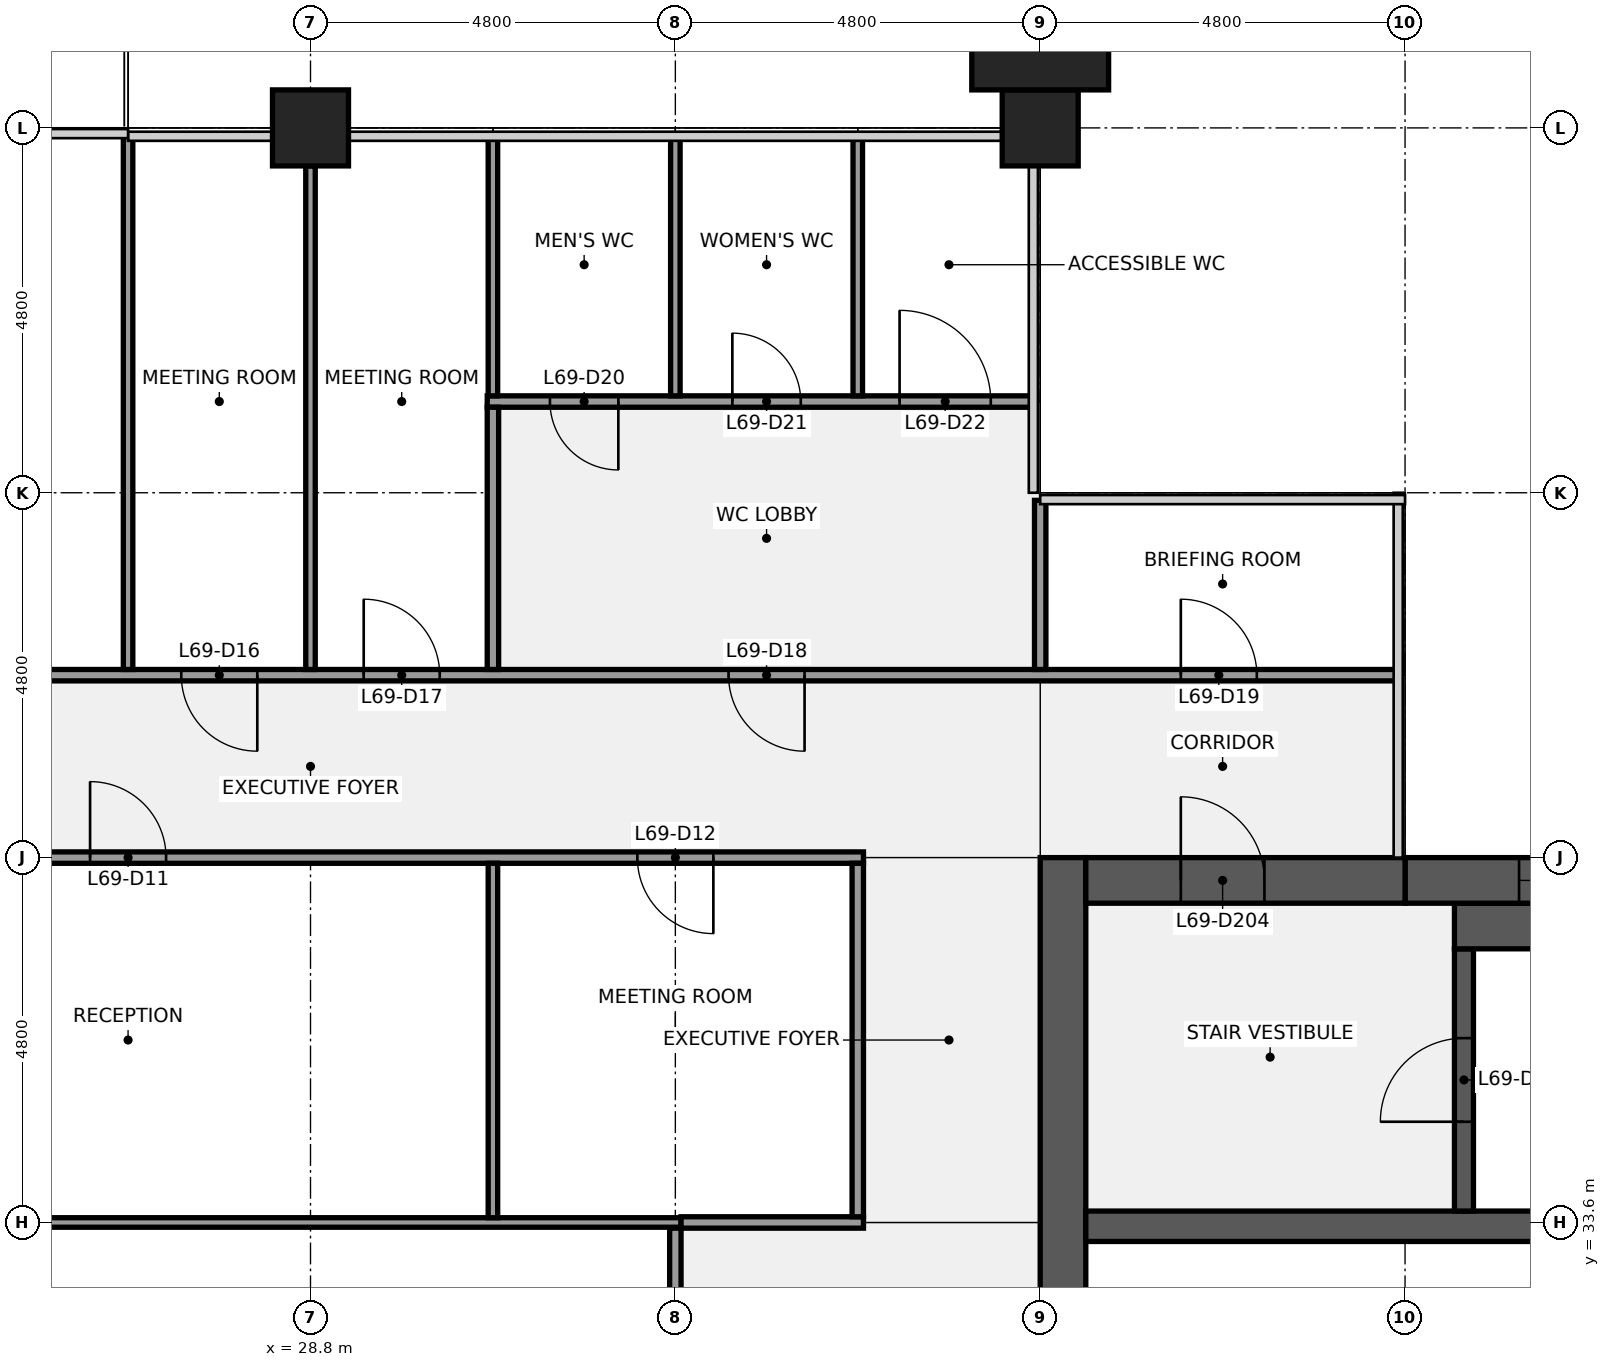
"""IFC4 building model, lengths in metres.
Left out: names, types, materials, properties, quantities, classifications, styles, units other than length and angle.
Written with IfcOpenShell. Run it as: python <this file> out.ifc"""

import sys

from ifc_helpers import new_model, si_unit, direction, frame, frame_2d, origin, origin_2d, place, context, subcontext, project, spatial, rectangle, extrude, element, fill, save


model = new_model("IFC4")
c1 = context("Model", 3, precision=1e-05, world=origin(), true_north=direction((0.0, 1.0)))
c2 = subcontext(c1, "Body", "Model", "MODEL_VIEW")
j1 = project(units=[si_unit("LENGTHUNIT", "METRE"), si_unit("PLANEANGLEUNIT", "RADIAN")], contexts=[c1])
p1 = place(None, origin())
s1 = spatial("IfcSite", under=j1, at=p1, CompositionType="ELEMENT")
p2 = place(p1, origin())
s2 = spatial("IfcBuilding", under=s1, at=p2, CompositionType="ELEMENT")
p3 = place(p2, frame((0.0, 0.0, 314.3)))
s3 = spatial("IfcBuildingStorey", under=s2, at=p3, CompositionType="ELEMENT", Elevation=314.3)
for number, where, z_axis, x_axis in (
    (1, (28.8, 48.0, 0.0), (0.0, 0.0, 1.0), (1.0, 0.0, 0.0)),
    (2, (38.4, 48.0, 0.0), (0.0, 0.0, 1.0), (1.0, 0.0, 0.0)),
):
    element("IfcColumn", number, at=place(p3, frame(where, z_axis=z_axis, x_axis=x_axis)), inside=s3, PredefinedType="COLUMN", context=c2, shape_type="SweptSolid", body=[
        extrude(rectangle(XDim=1.0, YDim=1.0, at=origin_2d()), origin(), (0.0, 0.0, 1.0), 4.0),
    ])
p4 = place(p3, frame((38.7, 9.6, 0.0), z_axis=(0.0, 0.0, 1.0), x_axis=(0.0, 1.0, 0.0)))
e3 = element("IfcWall", 3, at=p4, inside=s3, PredefinedType="SHEAR", context=c2, shape_type="SweptSolid", body=[
    extrude(rectangle(XDim=28.8, YDim=0.6, at=frame_2d((14.4, 0.0))), origin(), (0.0, 0.0, 1.0), 3.84),
])
p5 = place(p4, frame((8.7, 0.0, 0.0)))
e4 = element("IfcOpeningElement", 4, at=p5, cuts=e3, PredefinedType="OPENING", context=c2, shape_type="SweptSolid", body=[
    extrude(rectangle(XDim=1.8, YDim=2.1, at=frame_2d((0.9, 1.05))), frame((0.0, 0.31, 0.0), z_axis=(0.0, -1.0, 0.0), x_axis=(1.0, 0.0, 0.0)), (0.0, 0.0, 1.0), 0.62),
])
p6 = place(p4, frame((18.3, 0.0, 0.0)))
e5 = element("IfcOpeningElement", 5, at=p6, cuts=e3, PredefinedType="OPENING", context=c2, shape_type="SweptSolid", body=[
    extrude(rectangle(XDim=1.8, YDim=2.1, at=frame_2d((0.9, 1.05))), frame((0.0, 0.31, 0.0), z_axis=(0.0, -1.0, 0.0), x_axis=(1.0, 0.0, 0.0)), (0.0, 0.0, 1.0), 0.62),
])
p7 = place(p3, frame((39.0, 33.55, 0.0), z_axis=(0.0, 0.0, 1.0), x_axis=(1.0, 0.0, 0.0)))
e6 = element("IfcWall", 6, at=p7, inside=s3, PredefinedType="SHEAR", context=c2, shape_type="SweptSolid", body=[
    extrude(rectangle(XDim=18.0, YDim=0.4, at=frame_2d((9.0, 0.0))), origin(), (0.0, 0.0, 1.0), 3.84),
])
p8 = place(p3, frame((43.975, 33.75, 0.0), z_axis=(0.0, 0.0, 1.0), x_axis=(0.0, 1.0, 0.0)))
e7 = element("IfcWall", 7, at=p8, inside=s3, PredefinedType="SHEAR", context=c2, shape_type="SweptSolid", body=[
    extrude(rectangle(XDim=3.45, YDim=0.25, at=frame_2d((1.725, 0.0))), origin(), (0.0, 0.0, 1.0), 3.84),
])
p9 = place(p8, frame((1.175, 0.0, 0.0)))
e8 = element("IfcOpeningElement", 8, at=p9, cuts=e7, PredefinedType="OPENING", context=c2, shape_type="SweptSolid", body=[
    extrude(rectangle(XDim=1.1, YDim=2.1, at=frame_2d((0.55, 1.05))), frame((0.0, 0.135, 0.0), z_axis=(0.0, -1.0, 0.0), x_axis=(1.0, 0.0, 0.0)), (0.0, 0.0, 1.0), 0.27),
])
p10 = place(p3, frame((43.85, 37.5, 0.0), z_axis=(0.0, 0.0, 1.0), x_axis=(1.0, 0.0, 0.0)))
e9 = element("IfcWall", 9, at=p10, inside=s3, PredefinedType="SHEAR", context=c2, shape_type="SweptSolid", body=[
    extrude(rectangle(XDim=7.5, YDim=0.6, at=frame_2d((3.75, 0.0))), origin(), (0.0, 0.0, 1.0), 3.84),
])
p11 = place(p3, frame((43.2, 38.1, 0.0), z_axis=(0.0, 0.0, 1.0), x_axis=(1.0, 0.0, 0.0)))
e10 = element("IfcWall", 10, at=p11, inside=s3, PredefinedType="SHEAR", context=c2, shape_type="SweptSolid", body=[
    extrude(rectangle(XDim=13.8, YDim=0.6, at=frame_2d((6.9, 0.0))), origin(), (0.0, 0.0, 1.0), 3.84),
])
p12 = place(p11, frame((6.3, 0.0, 0.9)))
e11 = element("IfcOpeningElement", 11, at=p12, cuts=e10, PredefinedType="OPENING", context=c2, shape_type="SweptSolid", body=[
    extrude(rectangle(XDim=1.8, YDim=1.5, at=frame_2d((0.9, 0.75))), frame((0.0, 0.31, 0.0), z_axis=(0.0, -1.0, 0.0), x_axis=(1.0, 0.0, 0.0)), (0.0, 0.0, 1.0), 0.62),
])
p13 = place(p11, frame((1.5, 0.0, 0.9)))
e12 = element("IfcOpeningElement", 12, at=p13, cuts=e10, PredefinedType="OPENING", context=c2, shape_type="SweptSolid", body=[
    extrude(rectangle(XDim=1.8, YDim=1.5, at=frame_2d((0.9, 0.75))), frame((0.0, 0.31, 0.0), z_axis=(0.0, -1.0, 0.0), x_axis=(1.0, 0.0, 0.0)), (0.0, 0.0, 1.0), 0.62),
])
p14 = place(p3, frame((39.0, 38.1, 0.0), z_axis=(0.0, 0.0, 1.0), x_axis=(1.0, 0.0, 0.0)))
e13 = element("IfcWall", 13, at=p14, inside=s3, PredefinedType="SHEAR", context=c2, shape_type="SweptSolid", body=[
    extrude(rectangle(XDim=4.2, YDim=0.6, at=frame_2d((2.1, 0.0))), origin(), (0.0, 0.0, 1.0), 3.84),
])
p15 = place(p14, frame((1.25, 0.0, 0.0)))
e14 = element("IfcOpeningElement", 14, at=p15, cuts=e13, PredefinedType="OPENING", context=c2, shape_type="SweptSolid", body=[
    extrude(rectangle(XDim=1.1, YDim=2.1, at=frame_2d((0.55, 1.05))), frame((0.0, 0.31, 0.0), z_axis=(0.0, -1.0, 0.0), x_axis=(1.0, 0.0, 0.0)), (0.0, 0.0, 1.0), 0.62),
])
p16 = place(p3, frame((24.075, 33.6, 0.0), z_axis=(0.0, 0.0, 1.0), x_axis=(1.0, 0.0, 0.0)))
e15 = element("IfcWall", 15, at=p16, inside=s3, PredefinedType="PARTITIONING", context=c2, shape_type="SweptSolid", body=[
    extrude(rectangle(XDim=9.6, YDim=0.125, at=frame_2d((4.8, 0.0))), origin(), (0.0, 0.0, 1.0), 2.87),
])
p17 = place(p3, frame((33.675, 33.6, 0.0), z_axis=(0.0, 0.0, 1.0), x_axis=(1.0, 0.0, 0.0)))
e16 = element("IfcWall", 16, at=p17, inside=s3, PredefinedType="PARTITIONING", context=c2, shape_type="SweptSolid", body=[
    extrude(rectangle(XDim=2.4, YDim=0.15, at=frame_2d((1.2, 0.0))), origin(), (0.0, 0.0, 1.0), 2.87),
])
p18 = place(p3, frame((21.525, 38.4, 0.0), z_axis=(0.0, 0.0, 1.0), x_axis=(1.0, 0.0, 0.0)))
e17 = element("IfcWall", 17, at=p18, inside=s3, PredefinedType="PARTITIONING", context=c2, shape_type="SweptSolid", body=[
    extrude(rectangle(XDim=14.55, YDim=0.15, at=frame_2d((7.275, 0.0))), origin(), (0.0, 0.0, 1.0), 2.87),
])
p19 = place(p18, frame((4.375, 0.0, 0.0)))
e18 = element("IfcOpeningElement", 18, at=p19, cuts=e17, PredefinedType="OPENING", context=c2, shape_type="SweptSolid", body=[
    extrude(rectangle(XDim=1.0, YDim=2.1, at=frame_2d((0.5, 1.05))), frame((0.0, 0.085, 0.0), z_axis=(0.0, -1.0, 0.0), x_axis=(1.0, 0.0, 0.0)), (0.0, 0.0, 1.0), 0.17),
])
p20 = place(p18, frame((11.575, 0.0, 0.0)))
e19 = element("IfcOpeningElement", 19, at=p20, cuts=e17, PredefinedType="OPENING", context=c2, shape_type="SweptSolid", body=[
    extrude(rectangle(XDim=1.0, YDim=2.1, at=frame_2d((0.5, 1.05))), frame((0.0, 0.085, 0.0), z_axis=(0.0, -1.0, 0.0), x_axis=(1.0, 0.0, 0.0)), (0.0, 0.0, 1.0), 0.17),
])
p21 = place(p3, frame((14.5, 40.8, 0.0), z_axis=(0.0, 0.0, 1.0), x_axis=(1.0, 0.0, 0.0)))
e20 = element("IfcWall", 20, at=p21, inside=s3, PredefinedType="PARTITIONING", context=c2, shape_type="SweptSolid", body=[
    extrude(rectangle(XDim=28.6, YDim=0.15, at=frame_2d((14.3, 0.0))), origin(), (0.0, 0.0, 1.0), 2.87),
])
p22 = place(p21, frame((1.85, 0.0, 0.0)))
e21 = element("IfcOpeningElement", 21, at=p22, cuts=e20, PredefinedType="OPENING", context=c2, shape_type="SweptSolid", body=[
    extrude(rectangle(XDim=1.0, YDim=2.1, at=frame_2d((0.5, 1.05))), frame((0.0, 0.085, 0.0), z_axis=(0.0, -1.0, 0.0), x_axis=(1.0, 0.0, 0.0)), (0.0, 0.0, 1.0), 0.17),
])
p23 = place(p21, frame((5.4, 0.0, 0.0)))
e22 = element("IfcOpeningElement", 22, at=p23, cuts=e20, PredefinedType="OPENING", context=c2, shape_type="SweptSolid", body=[
    extrude(rectangle(XDim=1.0, YDim=2.1, at=frame_2d((0.5, 1.05))), frame((0.0, 0.085, 0.0), z_axis=(0.0, -1.0, 0.0), x_axis=(1.0, 0.0, 0.0)), (0.0, 0.0, 1.0), 0.17),
])
p24 = place(p21, frame((9.0, 0.0, 0.0)))
e23 = element("IfcOpeningElement", 23, at=p24, cuts=e20, PredefinedType="OPENING", context=c2, shape_type="SweptSolid", body=[
    extrude(rectangle(XDim=1.0, YDim=2.1, at=frame_2d((0.5, 1.05))), frame((0.0, 0.085, 0.0), z_axis=(0.0, -1.0, 0.0), x_axis=(1.0, 0.0, 0.0)), (0.0, 0.0, 1.0), 0.17),
])
p25 = place(p21, frame((12.6, 0.0, 0.0)))
e24 = element("IfcOpeningElement", 24, at=p25, cuts=e20, PredefinedType="OPENING", context=c2, shape_type="SweptSolid", body=[
    extrude(rectangle(XDim=1.0, YDim=2.1, at=frame_2d((0.5, 1.05))), frame((0.0, 0.085, 0.0), z_axis=(0.0, -1.0, 0.0), x_axis=(1.0, 0.0, 0.0)), (0.0, 0.0, 1.0), 0.17),
])
p26 = place(p21, frame((15.0, 0.0, 0.0)))
e25 = element("IfcOpeningElement", 25, at=p26, cuts=e20, PredefinedType="OPENING", context=c2, shape_type="SweptSolid", body=[
    extrude(rectangle(XDim=1.0, YDim=2.1, at=frame_2d((0.5, 1.05))), frame((0.0, 0.085, 0.0), z_axis=(0.0, -1.0, 0.0), x_axis=(1.0, 0.0, 0.0)), (0.0, 0.0, 1.0), 0.17),
])
p27 = place(p21, frame((19.8, 0.0, 0.0)))
e26 = element("IfcOpeningElement", 26, at=p27, cuts=e20, PredefinedType="OPENING", context=c2, shape_type="SweptSolid", body=[
    extrude(rectangle(XDim=1.0, YDim=2.1, at=frame_2d((0.5, 1.05))), frame((0.0, 0.085, 0.0), z_axis=(0.0, -1.0, 0.0), x_axis=(1.0, 0.0, 0.0)), (0.0, 0.0, 1.0), 0.17),
])
p28 = place(p21, frame((25.75, 0.0, 0.0)))
e27 = element("IfcOpeningElement", 27, at=p28, cuts=e20, PredefinedType="OPENING", context=c2, shape_type="SweptSolid", body=[
    extrude(rectangle(XDim=1.0, YDim=2.1, at=frame_2d((0.5, 1.05))), frame((0.0, 0.085, 0.0), z_axis=(0.0, -1.0, 0.0), x_axis=(1.0, 0.0, 0.0)), (0.0, 0.0, 1.0), 0.17),
])
p29 = place(p3, frame((31.125, 44.4, 0.0), z_axis=(0.0, 0.0, 1.0), x_axis=(1.0, 0.0, 0.0)))
e28 = element("IfcWall", 28, at=p29, inside=s3, PredefinedType="PARTITIONING", context=c2, shape_type="SweptSolid", body=[
    extrude(rectangle(XDim=7.175, YDim=0.15, at=frame_2d((3.587, 0.0))), origin(), (0.0, 0.0, 1.0), 2.87),
])
p30 = place(p29, frame((0.825, 0.0, 0.0)))
e29 = element("IfcOpeningElement", 29, at=p30, cuts=e28, PredefinedType="OPENING", context=c2, shape_type="SweptSolid", body=[
    extrude(rectangle(XDim=0.9, YDim=2.1, at=frame_2d((0.45, 1.05))), frame((0.0, 0.085, 0.0), z_axis=(0.0, -1.0, 0.0), x_axis=(1.0, 0.0, 0.0)), (0.0, 0.0, 1.0), 0.17),
])
p31 = place(p29, frame((3.225, 0.0, 0.0)))
e30 = element("IfcOpeningElement", 30, at=p31, cuts=e28, PredefinedType="OPENING", context=c2, shape_type="SweptSolid", body=[
    extrude(rectangle(XDim=0.9, YDim=2.1, at=frame_2d((0.45, 1.05))), frame((0.0, 0.085, 0.0), z_axis=(0.0, -1.0, 0.0), x_axis=(1.0, 0.0, 0.0)), (0.0, 0.0, 1.0), 0.17),
])
p32 = place(p29, frame((5.425, 0.0, 0.0)))
e31 = element("IfcOpeningElement", 31, at=p32, cuts=e28, PredefinedType="OPENING", context=c2, shape_type="SweptSolid", body=[
    extrude(rectangle(XDim=1.2, YDim=2.1, at=frame_2d((0.6, 1.05))), frame((0.0, 0.085, 0.0), z_axis=(0.0, -1.0, 0.0), x_axis=(1.0, 0.0, 0.0)), (0.0, 0.0, 1.0), 0.17),
])
p33 = place(p3, frame((26.4, 40.875, 0.0), z_axis=(0.0, 0.0, 1.0), x_axis=(0.0, 1.0, 0.0)))
e32 = element("IfcWall", 32, at=p33, inside=s3, PredefinedType="PARTITIONING", context=c2, shape_type="SweptSolid", body=[
    extrude(rectangle(XDim=7.025, YDim=0.125, at=frame_2d((3.512, 0.0))), origin(), (0.0, 0.0, 1.0), 2.87),
])
p34 = place(p3, frame((28.8, 40.875, 0.0), z_axis=(0.0, 0.0, 1.0), x_axis=(0.0, 1.0, 0.0)))
e33 = element("IfcWall", 33, at=p34, inside=s3, PredefinedType="PARTITIONING", context=c2, shape_type="SweptSolid", body=[
    extrude(rectangle(XDim=6.625, YDim=0.125, at=frame_2d((3.312, 0.0))), origin(), (0.0, 0.0, 1.0), 2.87),
])
p35 = place(p3, frame((31.2, 33.663, 0.0), z_axis=(0.0, 0.0, 1.0), x_axis=(0.0, 1.0, 0.0)))
e34 = element("IfcWall", 34, at=p35, inside=s3, PredefinedType="PARTITIONING", context=c2, shape_type="SweptSolid", body=[
    extrude(rectangle(XDim=4.662, YDim=0.125, at=frame_2d((2.331, 0.0))), origin(), (0.0, 0.0, 1.0), 2.87),
])
p36 = place(p3, frame((31.2, 44.475, 0.0), z_axis=(0.0, 0.0, 1.0), x_axis=(0.0, 1.0, 0.0)))
e35 = element("IfcWall", 35, at=p36, inside=s3, PredefinedType="PARTITIONING", context=c2, shape_type="SweptSolid", body=[
    extrude(rectangle(XDim=3.425, YDim=0.125, at=frame_2d((1.712, 0.0))), origin(), (0.0, 0.0, 1.0), 2.87),
])
p37 = place(p3, frame((31.2, 40.875, 0.0), z_axis=(0.0, 0.0, 1.0), x_axis=(0.0, 1.0, 0.0)))
e36 = element("IfcWall", 36, at=p37, inside=s3, PredefinedType="PARTITIONING", context=c2, shape_type="SweptSolid", body=[
    extrude(rectangle(XDim=3.45, YDim=0.15, at=frame_2d((1.725, 0.0))), origin(), (0.0, 0.0, 1.0), 2.87),
])
p38 = place(p3, frame((33.6, 44.475, 0.0), z_axis=(0.0, 0.0, 1.0), x_axis=(0.0, 1.0, 0.0)))
e37 = element("IfcWall", 37, at=p38, inside=s3, PredefinedType="PARTITIONING", context=c2, shape_type="SweptSolid", body=[
    extrude(rectangle(XDim=3.425, YDim=0.125, at=frame_2d((1.712, 0.0))), origin(), (0.0, 0.0, 1.0), 2.87),
])
p39 = place(p3, frame((33.6, 27.663, 0.0), z_axis=(0.0, 0.0, 1.0), x_axis=(0.0, 1.0, 0.0)))
e38 = element("IfcWall", 38, at=p39, inside=s3, PredefinedType="PARTITIONING", context=c2, shape_type="SweptSolid", body=[
    extrude(rectangle(XDim=5.862, YDim=0.15, at=frame_2d((2.931, 0.0))), origin(), (0.0, 0.0, 1.0), 2.87),
])
p40 = place(p3, frame((36.0, 44.475, 0.0), z_axis=(0.0, 0.0, 1.0), x_axis=(0.0, 1.0, 0.0)))
e39 = element("IfcWall", 39, at=p40, inside=s3, PredefinedType="PARTITIONING", context=c2, shape_type="SweptSolid", body=[
    extrude(rectangle(XDim=3.425, YDim=0.125, at=frame_2d((1.712, 0.0))), origin(), (0.0, 0.0, 1.0), 2.87),
])
p41 = place(p3, frame((36.0, 33.675, 0.0), z_axis=(0.0, 0.0, 1.0), x_axis=(0.0, 1.0, 0.0)))
e40 = element("IfcWall", 40, at=p41, inside=s3, PredefinedType="PARTITIONING", context=c2, shape_type="SweptSolid", body=[
    extrude(rectangle(XDim=4.65, YDim=0.15, at=frame_2d((2.325, 0.0))), origin(), (0.0, 0.0, 1.0), 2.87),
])
p42 = place(p3, frame((38.4, 40.875, 0.0), z_axis=(0.0, 0.0, 1.0), x_axis=(0.0, 1.0, 0.0)))
e41 = element("IfcWall", 41, at=p42, inside=s3, PredefinedType="PARTITIONING", context=c2, shape_type="SweptSolid", body=[
    extrude(rectangle(XDim=2.225, YDim=0.15, at=frame_2d((1.113, 0.0))), origin(), (0.0, 0.0, 1.0), 2.87),
])
p43 = place(p3, frame((38.4, 49.0, 0.0), z_axis=(0.0, 0.0, 1.0), x_axis=(1.0, 0.0, 0.0)))
e42 = element("IfcColumn", 42, at=p43, inside=s3, PredefinedType="PILASTER", context=c2, shape_type="SweptSolid", body=[
    extrude(rectangle(XDim=1.8, YDim=1.0, at=origin_2d()), origin(), (0.0, 0.0, 1.0), 4.0),
])
p44 = place(p9, origin())
e43 = element("IfcDoor", 43, at=p44, inside=s3, OperationType="SINGLE_SWING_LEFT", PredefinedType="DOOR", context=c2, shape_type="SweptSolid", body=[
    extrude(rectangle(XDim=1.1, YDim=2.1, at=frame_2d((0.55, 1.05))), frame((0.0, 0.025, 0.0), z_axis=(0.0, -1.0, 0.0), x_axis=(1.0, 0.0, 0.0)), (0.0, 0.0, 1.0), 0.05),
])
fill(e8, e43)
p45 = place(p15, origin())
e44 = element("IfcDoor", 44, at=p45, inside=s3, OperationType="SINGLE_SWING_LEFT", PredefinedType="DOOR", context=c2, shape_type="SweptSolid", body=[
    extrude(rectangle(XDim=1.1, YDim=2.1, at=frame_2d((0.55, 1.05))), frame((0.0, 0.025, 0.0), z_axis=(0.0, -1.0, 0.0), x_axis=(1.0, 0.0, 0.0)), (0.0, 0.0, 1.0), 0.05),
])
fill(e14, e44)
p46 = place(p13, origin())
e45 = element("IfcWindow", 45, at=p46, inside=s3, PartitioningType="SINGLE_PANEL", PredefinedType="WINDOW", context=c2, shape_type="SweptSolid", body=[
    extrude(rectangle(XDim=1.8, YDim=1.5, at=frame_2d((0.9, 0.75))), frame((0.0, 0.03, 0.0), z_axis=(0.0, -1.0, 0.0), x_axis=(1.0, 0.0, 0.0)), (0.0, 0.0, 1.0), 0.06),
])
fill(e12, e45)
p47 = place(p19, origin())
e46 = element("IfcDoor", 46, at=p47, inside=s3, OperationType="SINGLE_SWING_LEFT", PredefinedType="DOOR", context=c2, shape_type="SweptSolid", body=[
    extrude(rectangle(XDim=1.0, YDim=2.1, at=frame_2d((0.5, 1.05))), frame((0.0, 0.025, 0.0), z_axis=(0.0, -1.0, 0.0), x_axis=(1.0, 0.0, 0.0)), (0.0, 0.0, 1.0), 0.05),
])
fill(e18, e46)
p48 = place(p20, origin())
e47 = element("IfcDoor", 47, at=p48, inside=s3, OperationType="SINGLE_SWING_RIGHT", PredefinedType="DOOR", context=c2, shape_type="SweptSolid", body=[
    extrude(rectangle(XDim=1.0, YDim=2.1, at=frame_2d((0.5, 1.05))), frame((0.0, 0.025, 0.0), z_axis=(0.0, -1.0, 0.0), x_axis=(1.0, 0.0, 0.0)), (0.0, 0.0, 1.0), 0.05),
])
fill(e19, e47)
p49 = place(p25, origin())
e48 = element("IfcDoor", 48, at=p49, inside=s3, OperationType="SINGLE_SWING_RIGHT", PredefinedType="DOOR", context=c2, shape_type="SweptSolid", body=[
    extrude(rectangle(XDim=1.0, YDim=2.1, at=frame_2d((0.5, 1.05))), frame((0.0, 0.025, 0.0), z_axis=(0.0, -1.0, 0.0), x_axis=(1.0, 0.0, 0.0)), (0.0, 0.0, 1.0), 0.05),
])
fill(e24, e48)
p50 = place(p26, origin())
e49 = element("IfcDoor", 49, at=p50, inside=s3, OperationType="SINGLE_SWING_LEFT", PredefinedType="DOOR", context=c2, shape_type="SweptSolid", body=[
    extrude(rectangle(XDim=1.0, YDim=2.1, at=frame_2d((0.5, 1.05))), frame((0.0, 0.025, 0.0), z_axis=(0.0, -1.0, 0.0), x_axis=(1.0, 0.0, 0.0)), (0.0, 0.0, 1.0), 0.05),
])
fill(e25, e49)
p51 = place(p27, origin())
e50 = element("IfcDoor", 50, at=p51, inside=s3, OperationType="SINGLE_SWING_RIGHT", PredefinedType="DOOR", context=c2, shape_type="SweptSolid", body=[
    extrude(rectangle(XDim=1.0, YDim=2.1, at=frame_2d((0.5, 1.05))), frame((0.0, 0.025, 0.0), z_axis=(0.0, -1.0, 0.0), x_axis=(1.0, 0.0, 0.0)), (0.0, 0.0, 1.0), 0.05),
])
fill(e26, e50)
p52 = place(p28, origin())
e51 = element("IfcDoor", 51, at=p52, inside=s3, OperationType="SINGLE_SWING_LEFT", PredefinedType="DOOR", context=c2, shape_type="SweptSolid", body=[
    extrude(rectangle(XDim=1.0, YDim=2.1, at=frame_2d((0.5, 1.05))), frame((0.0, 0.025, 0.0), z_axis=(0.0, -1.0, 0.0), x_axis=(1.0, 0.0, 0.0)), (0.0, 0.0, 1.0), 0.05),
])
fill(e27, e51)
p53 = place(p30, origin())
e52 = element("IfcDoor", 52, at=p53, inside=s3, OperationType="SINGLE_SWING_RIGHT", PredefinedType="DOOR", context=c2, shape_type="SweptSolid", body=[
    extrude(rectangle(XDim=0.9, YDim=2.1, at=frame_2d((0.45, 1.05))), frame((0.0, 0.025, 0.0), z_axis=(0.0, -1.0, 0.0), x_axis=(1.0, 0.0, 0.0)), (0.0, 0.0, 1.0), 0.05),
])
fill(e29, e52)
p54 = place(p31, origin())
e53 = element("IfcDoor", 53, at=p54, inside=s3, OperationType="SINGLE_SWING_LEFT", PredefinedType="DOOR", context=c2, shape_type="SweptSolid", body=[
    extrude(rectangle(XDim=0.9, YDim=2.1, at=frame_2d((0.45, 1.05))), frame((0.0, 0.025, 0.0), z_axis=(0.0, -1.0, 0.0), x_axis=(1.0, 0.0, 0.0)), (0.0, 0.0, 1.0), 0.05),
])
fill(e30, e53)
p55 = place(p32, origin())
e54 = element("IfcDoor", 54, at=p55, inside=s3, OperationType="SINGLE_SWING_LEFT", PredefinedType="DOOR", context=c2, shape_type="SweptSolid", body=[
    extrude(rectangle(XDim=1.2, YDim=2.1, at=frame_2d((0.6, 1.05))), frame((0.0, 0.025, 0.0), z_axis=(0.0, -1.0, 0.0), x_axis=(1.0, 0.0, 0.0)), (0.0, 0.0, 1.0), 0.05),
])
fill(e31, e54)
save(model, sys.argv[1])
